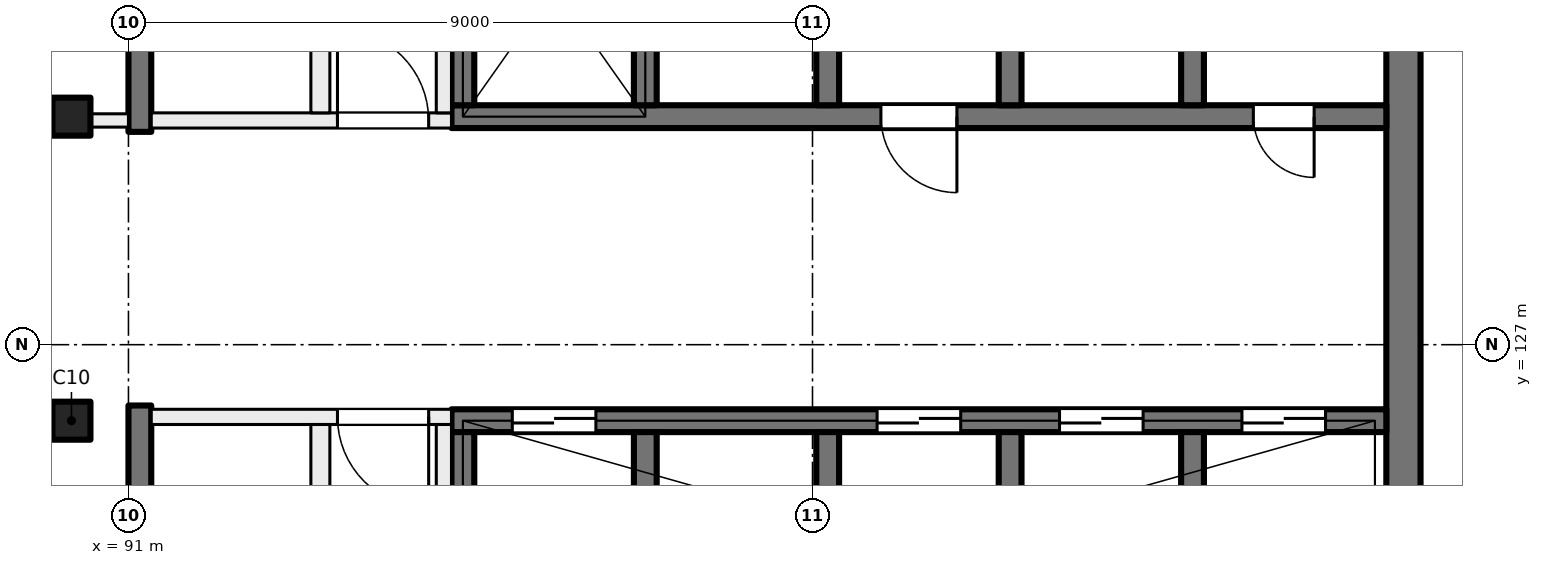
"""IFC4 building model, lengths in metres.
Left out: names, types, materials, properties, quantities, classifications, styles, units other than length and angle.
Written with IfcOpenShell. Run it as: python <this file> out.ifc"""

import sys

from ifc_helpers import new_model, si_unit, direction, frame, frame_2d, origin, origin_2d, place, context, subcontext, project, spatial, rectangle, extrude, element, fill, save


model = new_model("IFC4")
c1 = context("Model", 3, precision=1e-05, world=origin(), true_north=direction((0.0, 1.0)))
c2 = subcontext(c1, "Body", "Model", "MODEL_VIEW")
j1 = project(units=[si_unit("LENGTHUNIT", "METRE"), si_unit("PLANEANGLEUNIT", "RADIAN")], contexts=[c1])
p1 = place(None, origin())
s1 = spatial("IfcSite", under=j1, at=p1, CompositionType="ELEMENT")
p2 = place(p1, origin())
s2 = spatial("IfcBuilding", under=s1, at=p2, CompositionType="ELEMENT")
p3 = place(p2, frame((0.0, 0.0, 241.5)))
s3 = spatial("IfcBuildingStorey", under=s2, at=p3, CompositionType="ELEMENT", Elevation=241.5)
for number, where, z_axis, x_axis in (
    (1, (90.25, 130.0, 0.0), (0.0, 0.0, 1.0), (1.0, 0.0, 0.0)),
    (2, (90.25, 126.0, 0.0), (0.0, 0.0, 1.0), (1.0, 0.0, 0.0)),
):
    element("IfcColumn", number, at=place(p3, frame(where, z_axis=z_axis, x_axis=x_axis)), inside=s3, PredefinedType="COLUMN", context=c2, shape_type="SweptSolid", body=[
        extrude(rectangle(XDim=0.5, YDim=0.5, at=origin_2d()), origin(), (0.0, 0.0, 1.0), 4.0),
    ])
p4 = place(p3, frame((107.775, 135.2, 0.0), z_axis=(0.0, 0.0, 1.0), x_axis=(0.0, -1.0, 0.0)))
e3 = element("IfcWall", 3, at=p4, inside=s3, PredefinedType="SHEAR", context=c2, shape_type="SweptSolid", body=[
    extrude(rectangle(XDim=14.4, YDim=0.45, at=frame_2d((7.2, 0.0))), origin(), (0.0, 0.0, 1.0), 4.0),
])
p5 = place(p3, frame((107.55, 130.0, 0.0), z_axis=(0.0, 0.0, 1.0), x_axis=(-1.0, 0.0, 0.0)))
e4 = element("IfcWall", 4, at=p5, inside=s3, PredefinedType="SHEAR", context=c2, shape_type="SweptSolid", body=[
    extrude(rectangle(XDim=12.3, YDim=0.3, at=frame_2d((6.15, 0.0))), origin(), (0.0, 0.0, 1.0), 4.0),
])
p6 = place(p5, frame((0.95, 0.0, 0.0)))
e5 = element("IfcOpeningElement", 5, at=p6, cuts=e4, PredefinedType="OPENING", context=c2, shape_type="SweptSolid", body=[
    extrude(rectangle(XDim=0.8, YDim=2.1, at=frame_2d((0.4, 1.05))), frame((0.0, 0.16, 0.0), z_axis=(0.0, -1.0, 0.0), x_axis=(1.0, 0.0, 0.0)), (0.0, 0.0, 1.0), 0.32),
])
p7 = place(p5, frame((5.65, 0.0, 0.0)))
e6 = element("IfcOpeningElement", 6, at=p7, cuts=e4, PredefinedType="OPENING", context=c2, shape_type="SweptSolid", body=[
    extrude(rectangle(XDim=1.0, YDim=2.1, at=frame_2d((0.5, 1.05))), frame((0.0, 0.16, 0.0), z_axis=(0.0, -1.0, 0.0), x_axis=(1.0, 0.0, 0.0)), (0.0, 0.0, 1.0), 0.32),
])
for number, where, z_axis, x_axis in (
    (7, (105.0, 133.25, 0.0), (0.0, 0.0, 1.0), (0.0, -1.0, 0.0)),
    (8, (102.6, 133.25, 0.0), (0.0, 0.0, 1.0), (0.0, -1.0, 0.0)),
    (9, (100.2, 133.25, 0.0), (0.0, 0.0, 1.0), (0.0, -1.0, 0.0)),
    (10, (97.8, 133.25, 0.0), (0.0, 0.0, 1.0), (0.0, -1.0, 0.0)),
    (11, (95.4, 133.25, 0.0), (0.0, 0.0, 1.0), (0.0, -1.0, 0.0)),
):
    element("IfcWall", number, at=place(p3, frame(where, z_axis=z_axis, x_axis=x_axis)), inside=s3, PredefinedType="SHEAR", context=c2, shape_type="SweptSolid", body=[
        extrude(rectangle(XDim=3.1, YDim=0.3, at=frame_2d((1.55, 0.0))), origin(), (0.0, 0.0, 1.0), 4.0),
    ])
p8 = place(p3, frame((107.55, 126.0, 0.0), z_axis=(0.0, 0.0, 1.0), x_axis=(-1.0, 0.0, 0.0)))
e12 = element("IfcWall", 12, at=p8, inside=s3, PredefinedType="SHEAR", context=c2, shape_type="SweptSolid", body=[
    extrude(rectangle(XDim=12.3, YDim=0.3, at=frame_2d((6.15, 0.0))), origin(), (0.0, 0.0, 1.0), 4.0),
])
p9 = place(p8, frame((0.8, 0.0, 0.0)))
e13 = element("IfcOpeningElement", 13, at=p9, cuts=e12, PredefinedType="OPENING", context=c2, shape_type="SweptSolid", body=[
    extrude(rectangle(XDim=1.1, YDim=2.1, at=frame_2d((0.55, 1.05))), frame((0.0, 0.16, 0.0), z_axis=(0.0, -1.0, 0.0), x_axis=(1.0, 0.0, 0.0)), (0.0, 0.0, 1.0), 0.32),
])
p10 = place(p8, frame((3.2, 0.0, 0.0)))
e14 = element("IfcOpeningElement", 14, at=p10, cuts=e12, PredefinedType="OPENING", context=c2, shape_type="SweptSolid", body=[
    extrude(rectangle(XDim=1.1, YDim=2.1, at=frame_2d((0.55, 1.05))), frame((0.0, 0.16, 0.0), z_axis=(0.0, -1.0, 0.0), x_axis=(1.0, 0.0, 0.0)), (0.0, 0.0, 1.0), 0.32),
])
p11 = place(p8, frame((5.6, 0.0, 0.0)))
e15 = element("IfcOpeningElement", 15, at=p11, cuts=e12, PredefinedType="OPENING", context=c2, shape_type="SweptSolid", body=[
    extrude(rectangle(XDim=1.1, YDim=2.1, at=frame_2d((0.55, 1.05))), frame((0.0, 0.16, 0.0), z_axis=(0.0, -1.0, 0.0), x_axis=(1.0, 0.0, 0.0)), (0.0, 0.0, 1.0), 0.32),
])
p12 = place(p8, frame((10.4, 0.0, 0.0)))
e16 = element("IfcOpeningElement", 16, at=p12, cuts=e12, PredefinedType="OPENING", context=c2, shape_type="SweptSolid", body=[
    extrude(rectangle(XDim=1.1, YDim=2.1, at=frame_2d((0.55, 1.05))), frame((0.0, 0.16, 0.0), z_axis=(0.0, -1.0, 0.0), x_axis=(1.0, 0.0, 0.0)), (0.0, 0.0, 1.0), 0.32),
])
for number, where, z_axis, x_axis in (
    (17, (105.0, 125.85, 0.0), (0.0, 0.0, 1.0), (0.0, -1.0, 0.0)),
    (18, (102.6, 125.85, 0.0), (0.0, 0.0, 1.0), (0.0, -1.0, 0.0)),
    (19, (100.2, 125.85, 0.0), (0.0, 0.0, 1.0), (0.0, -1.0, 0.0)),
    (20, (97.8, 125.85, 0.0), (0.0, 0.0, 1.0), (0.0, -1.0, 0.0)),
    (21, (95.4, 125.85, 0.0), (0.0, 0.0, 1.0), (0.0, -1.0, 0.0)),
):
    element("IfcWall", number, at=place(p3, frame(where, z_axis=z_axis, x_axis=x_axis)), inside=s3, PredefinedType="SHEAR", context=c2, shape_type="SweptSolid", body=[
        extrude(rectangle(XDim=3.1, YDim=0.3, at=frame_2d((1.55, 0.0))), origin(), (0.0, 0.0, 1.0), 4.0),
    ])
for number, where, z_axis, x_axis in (
    (22, (91.15, 138.55, 0.0), (0.0, 0.0, 1.0), (0.0, -1.0, 0.0)),
    (23, (91.15, 126.2, 0.0), (0.0, 0.0, 1.0), (0.0, -1.0, 0.0)),
):
    element("IfcWall", number, at=place(p3, frame(where, z_axis=z_axis, x_axis=x_axis)), inside=s3, PredefinedType="SHEAR", context=c2, shape_type="SweptSolid", body=[
        extrude(rectangle(XDim=8.75, YDim=0.3, at=frame_2d((4.375, 0.0))), origin(), (0.0, 0.0, 1.0), 4.0),
    ])
p13 = place(p3, frame((95.25, 126.05, 0.0), z_axis=(0.0, 0.0, 1.0), x_axis=(-1.0, 0.0, 0.0)))
e24 = element("IfcWall", 24, at=p13, inside=s3, PredefinedType="PARTITIONING", context=c2, shape_type="SweptSolid", body=[
    extrude(rectangle(XDim=3.95, YDim=0.2, at=frame_2d((1.975, 0.0))), origin(), (0.0, 0.0, 1.0), 3.625),
])
p14 = place(p13, frame((0.3, 0.0, 0.0)))
e25 = element("IfcOpeningElement", 25, at=p14, cuts=e24, PredefinedType="OPENING", context=c2, shape_type="SweptSolid", body=[
    extrude(rectangle(XDim=1.2, YDim=2.1, at=frame_2d((0.6, 1.05))), frame((0.0, 0.11, 0.0), z_axis=(0.0, -1.0, 0.0), x_axis=(1.0, 0.0, 0.0)), (0.0, 0.0, 1.0), 0.22),
])
p15 = place(p3, frame((95.15, 117.45, 0.0), z_axis=(0.0, 0.0, 1.0), x_axis=(0.0, 1.0, 0.0)))
e26 = element("IfcWall", 26, at=p15, inside=s3, PredefinedType="PARTITIONING", context=c2, shape_type="SweptSolid", body=[
    extrude(rectangle(XDim=8.5, YDim=0.2, at=frame_2d((4.25, 0.0))), origin(), (0.0, 0.0, 1.0), 3.625),
])
p16 = place(p15, frame((1.75, 0.0, 0.0)))
e27 = element("IfcOpeningElement", 27, at=p16, cuts=e26, PredefinedType="OPENING", context=c2, shape_type="SweptSolid", body=[
    extrude(rectangle(XDim=1.5, YDim=2.1, at=frame_2d((0.75, 1.05))), frame((0.0, 0.11, 0.0), z_axis=(0.0, -1.0, 0.0), x_axis=(1.0, 0.0, 0.0)), (0.0, 0.0, 1.0), 0.22),
])
p17 = place(p3, frame((93.525, 117.45, 0.0), z_axis=(0.0, 0.0, 1.0), x_axis=(0.0, 1.0, 0.0)))
e28 = element("IfcWall", 28, at=p17, inside=s3, PredefinedType="PARTITIONING", context=c2, shape_type="SweptSolid", body=[
    extrude(rectangle(XDim=8.5, YDim=0.25, at=frame_2d((4.25, 0.0))), origin(), (0.0, 0.0, 1.0), 3.625),
])
p18 = place(p17, frame((5.9, 0.0, 0.0)))
e29 = element("IfcOpeningElement", 29, at=p18, cuts=e28, PredefinedType="OPENING", context=c2, shape_type="SweptSolid", body=[
    extrude(rectangle(XDim=1.0, YDim=2.1, at=frame_2d((0.5, 1.05))), frame((0.0, 0.135, 0.0), z_axis=(0.0, -1.0, 0.0), x_axis=(1.0, 0.0, 0.0)), (0.0, 0.0, 1.0), 0.27),
])
p19 = place(p17, frame((1.6, 0.0, 0.0)))
e30 = element("IfcOpeningElement", 30, at=p19, cuts=e28, PredefinedType="OPENING", context=c2, shape_type="SweptSolid", body=[
    extrude(rectangle(XDim=1.0, YDim=2.1, at=frame_2d((0.5, 1.05))), frame((0.0, 0.135, 0.0), z_axis=(0.0, -1.0, 0.0), x_axis=(1.0, 0.0, 0.0)), (0.0, 0.0, 1.0), 0.27),
])
p20 = place(p3, frame((91.3, 129.95, 0.0), z_axis=(0.0, 0.0, 1.0), x_axis=(1.0, 0.0, 0.0)))
e31 = element("IfcWall", 31, at=p20, inside=s3, PredefinedType="PARTITIONING", context=c2, shape_type="SweptSolid", body=[
    extrude(rectangle(XDim=3.95, YDim=0.2, at=frame_2d((1.975, 0.0))), origin(), (0.0, 0.0, 1.0), 3.625),
])
p21 = place(p20, frame((2.45, 0.0, 0.0)))
e32 = element("IfcOpeningElement", 32, at=p21, cuts=e31, PredefinedType="OPENING", context=c2, shape_type="SweptSolid", body=[
    extrude(rectangle(XDim=1.2, YDim=2.1, at=frame_2d((0.6, 1.05))), frame((0.0, 0.11, 0.0), z_axis=(0.0, -1.0, 0.0), x_axis=(1.0, 0.0, 0.0)), (0.0, 0.0, 1.0), 0.22),
])
p22 = place(p3, frame((95.15, 130.05, 0.0), z_axis=(0.0, 0.0, 1.0), x_axis=(0.0, 1.0, 0.0)))
e33 = element("IfcWall", 33, at=p22, inside=s3, PredefinedType="PARTITIONING", context=c2, shape_type="SweptSolid", body=[
    extrude(rectangle(XDim=8.5, YDim=0.2, at=frame_2d((4.25, 0.0))), origin(), (0.0, 0.0, 1.0), 3.625),
])
p23 = place(p22, frame((5.25, 0.0, 0.0)))
e34 = element("IfcOpeningElement", 34, at=p23, cuts=e33, PredefinedType="OPENING", context=c2, shape_type="SweptSolid", body=[
    extrude(rectangle(XDim=1.5, YDim=2.1, at=frame_2d((0.75, 1.05))), frame((0.0, 0.11, 0.0), z_axis=(0.0, -1.0, 0.0), x_axis=(1.0, 0.0, 0.0)), (0.0, 0.0, 1.0), 0.22),
])
p24 = place(p3, frame((93.525, 130.05, 0.0), z_axis=(0.0, 0.0, 1.0), x_axis=(0.0, 1.0, 0.0)))
e35 = element("IfcWall", 35, at=p24, inside=s3, PredefinedType="PARTITIONING", context=c2, shape_type="SweptSolid", body=[
    extrude(rectangle(XDim=8.5, YDim=0.25, at=frame_2d((4.25, 0.0))), origin(), (0.0, 0.0, 1.0), 3.625),
])
p25 = place(p24, frame((3.85, 0.0, 0.0)))
e36 = element("IfcOpeningElement", 36, at=p25, cuts=e35, PredefinedType="OPENING", context=c2, shape_type="SweptSolid", body=[
    extrude(rectangle(XDim=0.8, YDim=2.1, at=frame_2d((0.4, 1.05))), frame((0.0, 0.135, 0.0), z_axis=(0.0, -1.0, 0.0), x_axis=(1.0, 0.0, 0.0)), (0.0, 0.0, 1.0), 0.27),
])
p26 = place(p3, frame((85.838, 129.95, 0.0), z_axis=(0.0, 0.0, 1.0), x_axis=(1.0, 0.0, 0.0)))
e37 = element("IfcWall", 37, at=p26, inside=s3, PredefinedType="PARTITIONING", context=c2, shape_type="SweptSolid", body=[
    extrude(rectangle(XDim=5.162, YDim=0.175, at=frame_2d((2.581, 0.0))), origin(), (0.0, 0.0, 1.0), 3.625),
])
p27 = place(p26, frame((1.971, 0.0, 0.0)))
e38 = element("IfcOpeningElement", 38, at=p27, cuts=e37, PredefinedType="OPENING", context=c2, shape_type="SweptSolid", body=[
    extrude(rectangle(XDim=1.2, YDim=2.1, at=frame_2d((0.6, 1.05))), frame((0.0, 0.097, 0.0), z_axis=(0.0, -1.0, 0.0), x_axis=(1.0, 0.0, 0.0)), (0.0, 0.0, 1.0), 0.195),
])
p28 = place(p9, origin())
e39 = element("IfcDoor", 39, at=p28, inside=s3, OperationType="DOUBLE_DOOR_SLIDING", PredefinedType="DOOR", context=c2, shape_type="SweptSolid", body=[
    extrude(rectangle(XDim=1.1, YDim=2.1, at=frame_2d((0.55, 1.05))), frame((0.0, 0.025, 0.0), z_axis=(0.0, -1.0, 0.0), x_axis=(1.0, 0.0, 0.0)), (0.0, 0.0, 1.0), 0.05),
])
fill(e13, e39)
p29 = place(p10, origin())
e40 = element("IfcDoor", 40, at=p29, inside=s3, OperationType="DOUBLE_DOOR_SLIDING", PredefinedType="DOOR", context=c2, shape_type="SweptSolid", body=[
    extrude(rectangle(XDim=1.1, YDim=2.1, at=frame_2d((0.55, 1.05))), frame((0.0, 0.025, 0.0), z_axis=(0.0, -1.0, 0.0), x_axis=(1.0, 0.0, 0.0)), (0.0, 0.0, 1.0), 0.05),
])
fill(e14, e40)
p30 = place(p11, origin())
e41 = element("IfcDoor", 41, at=p30, inside=s3, OperationType="DOUBLE_DOOR_SLIDING", PredefinedType="DOOR", context=c2, shape_type="SweptSolid", body=[
    extrude(rectangle(XDim=1.1, YDim=2.1, at=frame_2d((0.55, 1.05))), frame((0.0, 0.025, 0.0), z_axis=(0.0, -1.0, 0.0), x_axis=(1.0, 0.0, 0.0)), (0.0, 0.0, 1.0), 0.05),
])
fill(e15, e41)
p31 = place(p12, origin())
e42 = element("IfcDoor", 42, at=p31, inside=s3, OperationType="DOUBLE_DOOR_SLIDING", PredefinedType="DOOR", context=c2, shape_type="SweptSolid", body=[
    extrude(rectangle(XDim=1.1, YDim=2.1, at=frame_2d((0.55, 1.05))), frame((0.0, 0.025, 0.0), z_axis=(0.0, -1.0, 0.0), x_axis=(1.0, 0.0, 0.0)), (0.0, 0.0, 1.0), 0.05),
])
fill(e16, e42)
p32 = place(p6, origin())
e43 = element("IfcDoor", 43, at=p32, inside=s3, OperationType="SINGLE_SWING_LEFT", PredefinedType="DOOR", context=c2, shape_type="SweptSolid", body=[
    extrude(rectangle(XDim=0.8, YDim=2.1, at=frame_2d((0.4, 1.05))), frame((0.0, 0.025, 0.0), z_axis=(0.0, -1.0, 0.0), x_axis=(1.0, 0.0, 0.0)), (0.0, 0.0, 1.0), 0.05),
])
fill(e5, e43)
p33 = place(p7, origin())
e44 = element("IfcDoor", 44, at=p33, inside=s3, OperationType="SINGLE_SWING_RIGHT", PredefinedType="DOOR", context=c2, shape_type="SweptSolid", body=[
    extrude(rectangle(XDim=1.0, YDim=2.1, at=frame_2d((0.5, 1.05))), frame((0.0, 0.025, 0.0), z_axis=(0.0, -1.0, 0.0), x_axis=(1.0, 0.0, 0.0)), (0.0, 0.0, 1.0), 0.05),
])
fill(e6, e44)
p34 = place(p14, origin())
e45 = element("IfcDoor", 45, at=p34, inside=s3, OperationType="DOUBLE_DOOR_SINGLE_SWING", PredefinedType="DOOR", context=c2, shape_type="SweptSolid", body=[
    extrude(rectangle(XDim=1.2, YDim=2.1, at=frame_2d((0.6, 1.05))), frame((0.0, 0.025, 0.0), z_axis=(0.0, -1.0, 0.0), x_axis=(1.0, 0.0, 0.0)), (0.0, 0.0, 1.0), 0.05),
])
fill(e25, e45)
p35 = place(p21, origin())
e46 = element("IfcDoor", 46, at=p35, inside=s3, OperationType="DOUBLE_DOOR_SINGLE_SWING", PredefinedType="DOOR", context=c2, shape_type="SweptSolid", body=[
    extrude(rectangle(XDim=1.2, YDim=2.1, at=frame_2d((0.6, 1.05))), frame((0.0, 0.025, 0.0), z_axis=(0.0, -1.0, 0.0), x_axis=(1.0, 0.0, 0.0)), (0.0, 0.0, 1.0), 0.05),
])
fill(e32, e46)
save(model, sys.argv[1])
